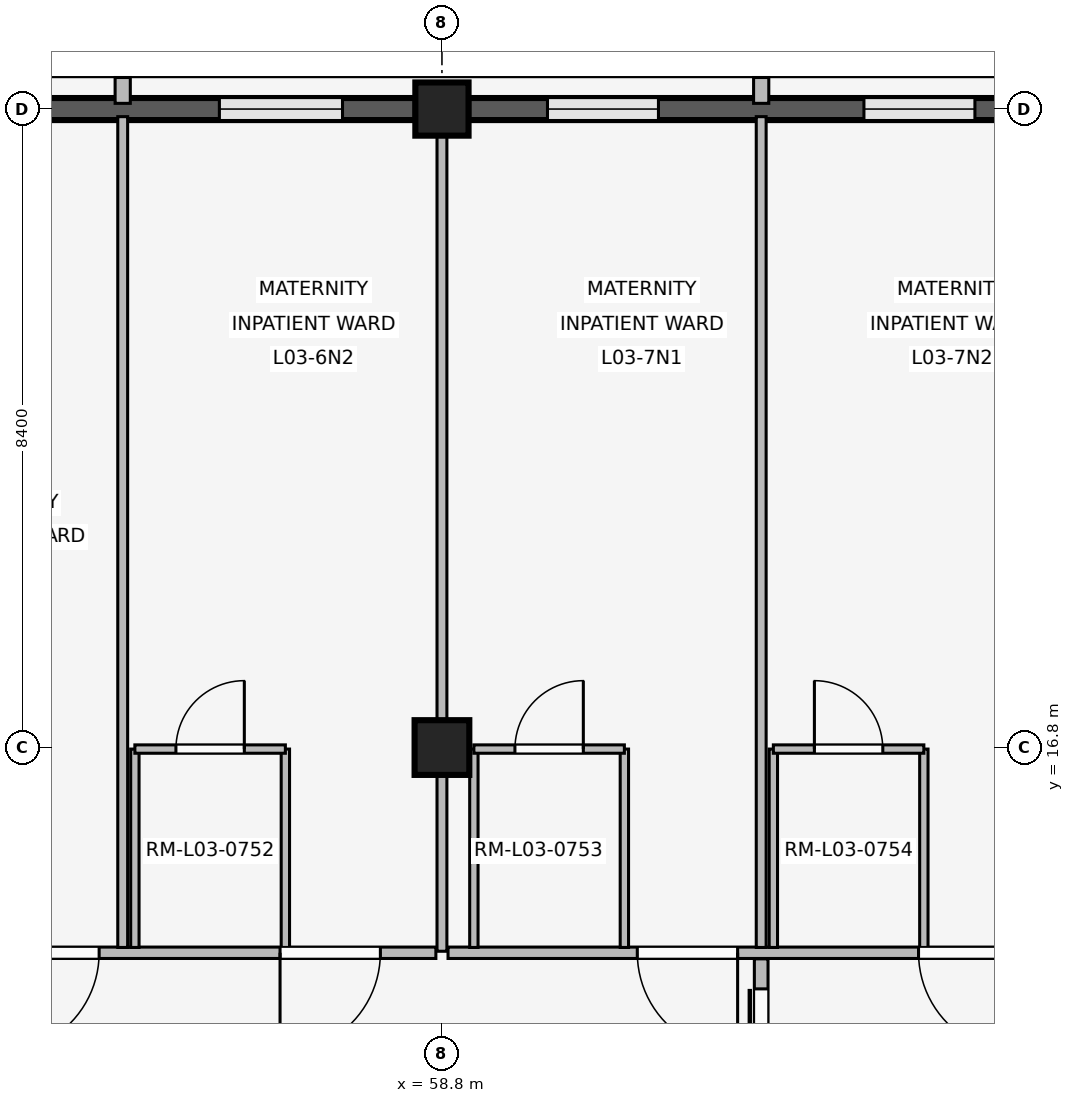
"""IFC4 building model, lengths in metres.
Left out: names, types, materials, properties, quantities, classifications, styles, units other than length and angle.
Written with IfcOpenShell. Run it as: python <this file> out.ifc"""

import sys

from ifc_helpers import new_model, si_unit, direction, frame, frame_2d, origin, origin_2d, place, context, subcontext, project, spatial, rectangle, extrude, element, fill, save


model = new_model("IFC4")
c1 = context("Model", 3, precision=1e-05, world=origin(), true_north=direction((0.0, 1.0)))
c2 = subcontext(c1, "Body", "Model", "MODEL_VIEW")
j1 = project(units=[si_unit("LENGTHUNIT", "METRE"), si_unit("PLANEANGLEUNIT", "RADIAN")], contexts=[c1])
p1 = place(None, origin())
s1 = spatial("IfcSite", under=j1, at=p1, CompositionType="ELEMENT")
p2 = place(p1, origin())
s2 = spatial("IfcBuilding", under=s1, at=p2, CompositionType="ELEMENT")
p3 = place(p2, frame((0.0, 0.0, 12.9)))
s3 = spatial("IfcBuildingStorey", under=s2, at=p3, CompositionType="ELEMENT", Elevation=12.9)
p4 = place(p3, frame((58.8, 16.8, 0.0), z_axis=(0.0, 0.0, 1.0), x_axis=(1.0, 0.0, 0.0)))
e1 = element("IfcColumn", 1, at=p4, inside=s3, PredefinedType="COLUMN", context=c2, shape_type="SweptSolid", body=[
    extrude(rectangle(XDim=0.72, YDim=0.72, at=origin_2d()), origin(), (0.0, 0.0, 1.0), 3.3),
])
p5 = place(p3, frame((58.8, 25.2, 0.0), z_axis=(0.0, 0.0, 1.0), x_axis=(1.0, 0.0, 0.0)))
e2 = element("IfcColumn", 2, at=p5, inside=s3, PredefinedType="COLUMN", context=c2, shape_type="SweptSolid", body=[
    extrude(rectangle(XDim=0.7, YDim=0.7, at=origin_2d()), origin(), (0.0, 0.0, 1.0), 3.3),
])
p6 = place(p3, frame((50.745, 25.2, 0.0), z_axis=(0.0, 0.0, 1.0), x_axis=(1.0, 0.0, 0.0)))
e3 = element("IfcWall", 3, at=p6, inside=s3, PredefinedType="SOLIDWALL", context=c2, shape_type="SweptSolid", body=[
    extrude(rectangle(XDim=7.71, YDim=0.29, at=frame_2d((3.855, 0.0))), origin(), (0.0, 0.0, 1.0), 2.44),
])
p7 = place(p6, frame((0.963, 0.0, 0.85)))
e4 = element("IfcOpeningElement", 4, at=p7, cuts=e3, PredefinedType="OPENING", context=c2, shape_type="SweptSolid", body=[
    extrude(rectangle(XDim=1.62, YDim=0.95, at=frame_2d((0.81, 0.475))), frame((0.0, 0.155, 0.0), z_axis=(0.0, -1.0, 0.0), x_axis=(1.0, 0.0, 0.0)), (0.0, 0.0, 1.0), 0.31),
])
p8 = place(p6, frame((5.127, 0.0, 0.85)))
e5 = element("IfcOpeningElement", 5, at=p8, cuts=e3, PredefinedType="OPENING", context=c2, shape_type="SweptSolid", body=[
    extrude(rectangle(XDim=1.62, YDim=0.95, at=frame_2d((0.81, 0.475))), frame((0.0, 0.155, 0.0), z_axis=(0.0, -1.0, 0.0), x_axis=(1.0, 0.0, 0.0)), (0.0, 0.0, 1.0), 0.31),
])
p9 = place(p3, frame((54.6, 25.275, 0.0), z_axis=(0.0, 0.0, 1.0), x_axis=(0.0, 1.0, 0.0)))
e6 = element("IfcWall", 6, at=p9, inside=s3, PredefinedType="ELEMENTEDWALL", context=c2, shape_type="SweptSolid", body=[
    extrude(rectangle(XDim=0.34, YDim=0.2, at=frame_2d((0.17, 0.0))), origin(), (0.0, 0.0, 1.0), 2.42),
])
p10 = place(p3, frame((59.145, 25.2, 0.0), z_axis=(0.0, 0.0, 1.0), x_axis=(1.0, 0.0, 0.0)))
e7 = element("IfcWall", 7, at=p10, inside=s3, PredefinedType="SOLIDWALL", context=c2, shape_type="SweptSolid", body=[
    extrude(rectangle(XDim=7.71, YDim=0.29, at=frame_2d((3.855, 0.0))), origin(), (0.0, 0.0, 1.0), 2.44),
])
p11 = place(p10, frame((1.043, 0.0, 0.85)))
e8 = element("IfcOpeningElement", 8, at=p11, cuts=e7, PredefinedType="OPENING", context=c2, shape_type="SweptSolid", body=[
    extrude(rectangle(XDim=1.46, YDim=0.85, at=frame_2d((0.73, 0.425))), frame((0.0, 0.155, 0.0), z_axis=(0.0, -1.0, 0.0), x_axis=(1.0, 0.0, 0.0)), (0.0, 0.0, 1.0), 0.31),
])
p12 = place(p10, frame((5.207, 0.0, 0.85)))
e9 = element("IfcOpeningElement", 9, at=p12, cuts=e7, PredefinedType="OPENING", context=c2, shape_type="SweptSolid", body=[
    extrude(rectangle(XDim=1.46, YDim=0.85, at=frame_2d((0.73, 0.425))), frame((0.0, 0.155, 0.0), z_axis=(0.0, -1.0, 0.0), x_axis=(1.0, 0.0, 0.0)), (0.0, 0.0, 1.0), 0.31),
])
p13 = place(p3, frame((63.0, 25.275, 0.0), z_axis=(0.0, 0.0, 1.0), x_axis=(0.0, 1.0, 0.0)))
e10 = element("IfcWall", 10, at=p13, inside=s3, PredefinedType="ELEMENTEDWALL", context=c2, shape_type="SweptSolid", body=[
    extrude(rectangle(XDim=0.34, YDim=0.2, at=frame_2d((0.17, 0.0))), origin(), (0.0, 0.0, 1.0), 2.42),
])
p14 = place(p3, frame((58.72, 14.1, 0.0), z_axis=(0.0, 0.0, 1.0), x_axis=(-1.0, 0.0, 0.0)))
e11 = element("IfcWall", 11, at=p14, inside=s3, PredefinedType="PARTITIONING", context=c2, shape_type="SweptSolid", body=[
    extrude(rectangle(XDim=7.96, YDim=0.15, at=frame_2d((3.98, 0.0))), origin(), (0.0, 0.0, 1.0), 2.42),
])
p15 = place(p14, frame((0.73, 0.0, 0.0)))
e12 = element("IfcOpeningElement", 12, at=p15, cuts=e11, PredefinedType="OPENING", context=c2, shape_type="SweptSolid", body=[
    extrude(rectangle(XDim=1.32, YDim=2.25, at=frame_2d((0.66, 1.125))), frame((0.0, 0.085, 0.0), z_axis=(0.0, -1.0, 0.0), x_axis=(1.0, 0.0, 0.0)), (0.0, 0.0, 1.0), 0.17),
])
p16 = place(p14, frame((4.43, 0.0, 0.0)))
e13 = element("IfcOpeningElement", 13, at=p16, cuts=e11, PredefinedType="OPENING", context=c2, shape_type="SweptSolid", body=[
    extrude(rectangle(XDim=1.32, YDim=2.25, at=frame_2d((0.66, 1.125))), frame((0.0, 0.085, 0.0), z_axis=(0.0, -1.0, 0.0), x_axis=(1.0, 0.0, 0.0)), (0.0, 0.0, 1.0), 0.17),
])
p17 = place(p3, frame((54.6, 14.17, 0.0), z_axis=(0.0, 0.0, 1.0), x_axis=(0.0, 1.0, 0.0)))
e14 = element("IfcWall", 14, at=p17, inside=s3, PredefinedType="PARTITIONING", context=c2, shape_type="SweptSolid", body=[
    extrude(rectangle(XDim=10.93, YDim=0.13, at=frame_2d((5.465, 0.0))), origin(), (0.0, 0.0, 1.0), 2.42),
])
for number, where, z_axis, x_axis in (
    (15, (54.76, 14.17, 0.0), (0.0, 0.0, 1.0), (0.0, 1.0, 0.0)),
    (16, (56.74, 14.17, 0.0), (0.0, 0.0, 1.0), (0.0, 1.0, 0.0)),
):
    element("IfcWall", number, at=place(p3, frame(where, z_axis=z_axis, x_axis=x_axis)), inside=s3, PredefinedType="PARTITIONING", context=c2, shape_type="SweptSolid", body=[
        extrude(rectangle(XDim=2.61, YDim=0.11, at=frame_2d((1.305, 0.0))), origin(), (0.0, 0.0, 1.0), 2.42),
    ])
p18 = place(p3, frame((54.76, 16.78, 0.0), z_axis=(0.0, 0.0, 1.0), x_axis=(1.0, 0.0, 0.0)))
e17 = element("IfcWall", 17, at=p18, inside=s3, PredefinedType="PARTITIONING", context=c2, shape_type="SweptSolid", body=[
    extrude(rectangle(XDim=1.98, YDim=0.11, at=frame_2d((0.99, 0.0))), origin(), (0.0, 0.0, 1.0), 2.42),
])
p19 = place(p18, frame((0.54, 0.0, 0.0)))
e18 = element("IfcOpeningElement", 18, at=p19, cuts=e17, PredefinedType="OPENING", context=c2, shape_type="SweptSolid", body=[
    extrude(rectangle(XDim=0.9, YDim=2.1, at=frame_2d((0.45, 1.05))), frame((0.0, 0.065, 0.0), z_axis=(0.0, -1.0, 0.0), x_axis=(1.0, 0.0, 0.0)), (0.0, 0.0, 1.0), 0.13),
])
p20 = place(p3, frame((58.8, 14.12, 0.0), z_axis=(0.0, 0.0, 1.0), x_axis=(0.0, 1.0, 0.0)))
e19 = element("IfcWall", 19, at=p20, inside=s3, PredefinedType="PARTITIONING", context=c2, shape_type="SweptSolid", body=[
    extrude(rectangle(XDim=10.94, YDim=0.13, at=frame_2d((5.47, 0.0))), origin(), (0.0, 0.0, 1.0), 2.42),
])
p21 = place(p3, frame((67.12, 14.1, 0.0), z_axis=(0.0, 0.0, 1.0), x_axis=(-1.0, 0.0, 0.0)))
e20 = element("IfcWall", 20, at=p21, inside=s3, PredefinedType="PARTITIONING", context=c2, shape_type="SweptSolid", body=[
    extrude(rectangle(XDim=8.24, YDim=0.15, at=frame_2d((4.12, 0.0))), origin(), (0.0, 0.0, 1.0), 2.42),
])
p22 = place(p21, frame((0.73, 0.0, 0.0)))
e21 = element("IfcOpeningElement", 21, at=p22, cuts=e20, PredefinedType="OPENING", context=c2, shape_type="SweptSolid", body=[
    extrude(rectangle(XDim=1.32, YDim=2.25, at=frame_2d((0.66, 1.125))), frame((0.0, 0.085, 0.0), z_axis=(0.0, -1.0, 0.0), x_axis=(1.0, 0.0, 0.0)), (0.0, 0.0, 1.0), 0.17),
])
p23 = place(p21, frame((4.43, 0.0, 0.0)))
e22 = element("IfcOpeningElement", 22, at=p23, cuts=e20, PredefinedType="OPENING", context=c2, shape_type="SweptSolid", body=[
    extrude(rectangle(XDim=1.32, YDim=2.25, at=frame_2d((0.66, 1.125))), frame((0.0, 0.085, 0.0), z_axis=(0.0, -1.0, 0.0), x_axis=(1.0, 0.0, 0.0)), (0.0, 0.0, 1.0), 0.17),
])
p24 = place(p3, frame((63.0, 14.17, 0.0), z_axis=(0.0, 0.0, 1.0), x_axis=(0.0, 1.0, 0.0)))
e23 = element("IfcWall", 23, at=p24, inside=s3, PredefinedType="PARTITIONING", context=c2, shape_type="SweptSolid", body=[
    extrude(rectangle(XDim=10.93, YDim=0.13, at=frame_2d((5.465, 0.0))), origin(), (0.0, 0.0, 1.0), 2.42),
])
for number, where, z_axis, x_axis in (
    (24, (59.22, 14.17, 0.0), (0.0, 0.0, 1.0), (0.0, 1.0, 0.0)),
    (25, (61.2, 14.17, 0.0), (0.0, 0.0, 1.0), (0.0, 1.0, 0.0)),
):
    element("IfcWall", number, at=place(p3, frame(where, z_axis=z_axis, x_axis=x_axis)), inside=s3, PredefinedType="PARTITIONING", context=c2, shape_type="SweptSolid", body=[
        extrude(rectangle(XDim=2.61, YDim=0.11, at=frame_2d((1.305, 0.0))), origin(), (0.0, 0.0, 1.0), 2.42),
    ])
p25 = place(p3, frame((59.22, 16.78, 0.0), z_axis=(0.0, 0.0, 1.0), x_axis=(1.0, 0.0, 0.0)))
e26 = element("IfcWall", 26, at=p25, inside=s3, PredefinedType="PARTITIONING", context=c2, shape_type="SweptSolid", body=[
    extrude(rectangle(XDim=1.98, YDim=0.11, at=frame_2d((0.99, 0.0))), origin(), (0.0, 0.0, 1.0), 2.42),
])
p26 = place(p25, frame((0.54, 0.0, 0.0)))
e27 = element("IfcOpeningElement", 27, at=p26, cuts=e26, PredefinedType="OPENING", context=c2, shape_type="SweptSolid", body=[
    extrude(rectangle(XDim=0.9, YDim=2.1, at=frame_2d((0.45, 1.05))), frame((0.0, 0.065, 0.0), z_axis=(0.0, -1.0, 0.0), x_axis=(1.0, 0.0, 0.0)), (0.0, 0.0, 1.0), 0.13),
])
for number, where, z_axis, x_axis in (
    (28, (63.16, 14.17, 0.0), (0.0, 0.0, 1.0), (0.0, 1.0, 0.0)),
    (29, (65.14, 14.17, 0.0), (0.0, 0.0, 1.0), (0.0, 1.0, 0.0)),
):
    element("IfcWall", number, at=place(p3, frame(where, z_axis=z_axis, x_axis=x_axis)), inside=s3, PredefinedType="PARTITIONING", context=c2, shape_type="SweptSolid", body=[
        extrude(rectangle(XDim=2.61, YDim=0.11, at=frame_2d((1.305, 0.0))), origin(), (0.0, 0.0, 1.0), 2.42),
    ])
p27 = place(p3, frame((63.16, 16.78, 0.0), z_axis=(0.0, 0.0, 1.0), x_axis=(1.0, 0.0, 0.0)))
e30 = element("IfcWall", 30, at=p27, inside=s3, PredefinedType="PARTITIONING", context=c2, shape_type="SweptSolid", body=[
    extrude(rectangle(XDim=1.98, YDim=0.11, at=frame_2d((0.99, 0.0))), origin(), (0.0, 0.0, 1.0), 2.42),
])
p28 = place(p27, frame((0.54, 0.0, 0.0)))
e31 = element("IfcOpeningElement", 31, at=p28, cuts=e30, PredefinedType="OPENING", context=c2, shape_type="SweptSolid", body=[
    extrude(rectangle(XDim=0.9, YDim=2.1, at=frame_2d((0.45, 1.05))), frame((0.0, 0.065, 0.0), z_axis=(0.0, -1.0, 0.0), x_axis=(1.0, 0.0, 0.0)), (0.0, 0.0, 1.0), 0.13),
])
p29 = place(p3, frame((63.0, 11.18, 0.0), z_axis=(0.0, 0.0, 1.0), x_axis=(0.0, 1.0, 0.0)))
e32 = element("IfcWall", 32, at=p29, inside=s3, PredefinedType="PARTITIONING", context=c2, shape_type="SweptSolid", body=[
    extrude(rectangle(XDim=2.84, YDim=0.18, at=frame_2d((1.42, 0.0))), origin(), (0.0, 0.0, 1.0), 2.42),
])
p30 = place(p29, frame((0.395, 0.0, 0.0)))
e33 = element("IfcOpeningElement", 33, at=p30, cuts=e32, PredefinedType="OPENING", context=c2, shape_type="SweptSolid", body=[
    extrude(rectangle(XDim=2.05, YDim=2.35, at=frame_2d((1.025, 1.175))), frame((0.0, 0.1, 0.0), z_axis=(0.0, -1.0, 0.0), x_axis=(1.0, 0.0, 0.0)), (0.0, 0.0, 1.0), 0.2),
])
p31 = place(p8, origin())
e34 = element("IfcWindow", 34, at=p31, inside=s3, PartitioningType="SINGLE_PANEL", PredefinedType="WINDOW", context=c2, shape_type="SweptSolid", body=[
    extrude(rectangle(XDim=1.62, YDim=0.95, at=frame_2d((0.81, 0.475))), frame((0.0, 0.03, 0.0), z_axis=(0.0, -1.0, 0.0), x_axis=(1.0, 0.0, 0.0)), (0.0, 0.0, 1.0), 0.06),
])
fill(e5, e34)
p32 = place(p11, origin())
e35 = element("IfcWindow", 35, at=p32, inside=s3, PartitioningType="SINGLE_PANEL", PredefinedType="WINDOW", context=c2, shape_type="SweptSolid", body=[
    extrude(rectangle(XDim=1.46, YDim=0.85, at=frame_2d((0.73, 0.425))), frame((0.0, 0.03, 0.0), z_axis=(0.0, -1.0, 0.0), x_axis=(1.0, 0.0, 0.0)), (0.0, 0.0, 1.0), 0.06),
])
fill(e8, e35)
p33 = place(p12, origin())
e36 = element("IfcWindow", 36, at=p33, inside=s3, PartitioningType="SINGLE_PANEL", PredefinedType="WINDOW", context=c2, shape_type="SweptSolid", body=[
    extrude(rectangle(XDim=1.46, YDim=0.85, at=frame_2d((0.73, 0.425))), frame((0.0, 0.03, 0.0), z_axis=(0.0, -1.0, 0.0), x_axis=(1.0, 0.0, 0.0)), (0.0, 0.0, 1.0), 0.06),
])
fill(e9, e36)
p34 = place(p15, origin())
e37 = element("IfcDoor", 37, at=p34, inside=s3, OperationType="SINGLE_SWING_RIGHT", PredefinedType="DOOR", context=c2, shape_type="SweptSolid", body=[
    extrude(rectangle(XDim=1.32, YDim=2.25, at=frame_2d((0.66, 1.125))), frame((0.0, 0.025, 0.0), z_axis=(0.0, -1.0, 0.0), x_axis=(1.0, 0.0, 0.0)), (0.0, 0.0, 1.0), 0.05),
])
fill(e12, e37)
p35 = place(p16, origin())
e38 = element("IfcDoor", 38, at=p35, inside=s3, OperationType="SINGLE_SWING_RIGHT", PredefinedType="DOOR", context=c2, shape_type="SweptSolid", body=[
    extrude(rectangle(XDim=1.32, YDim=2.25, at=frame_2d((0.66, 1.125))), frame((0.0, 0.025, 0.0), z_axis=(0.0, -1.0, 0.0), x_axis=(1.0, 0.0, 0.0)), (0.0, 0.0, 1.0), 0.05),
])
fill(e13, e38)
p36 = place(p19, origin())
e39 = element("IfcDoor", 39, at=p36, inside=s3, OperationType="SINGLE_SWING_RIGHT", PredefinedType="DOOR", context=c2, shape_type="SweptSolid", body=[
    extrude(rectangle(XDim=0.9, YDim=2.1, at=frame_2d((0.45, 1.05))), frame((0.0, 0.025, 0.0), z_axis=(0.0, -1.0, 0.0), x_axis=(1.0, 0.0, 0.0)), (0.0, 0.0, 1.0), 0.05),
])
fill(e18, e39)
p37 = place(p22, origin())
e40 = element("IfcDoor", 40, at=p37, inside=s3, OperationType="SINGLE_SWING_LEFT", PredefinedType="DOOR", context=c2, shape_type="SweptSolid", body=[
    extrude(rectangle(XDim=1.32, YDim=2.25, at=frame_2d((0.66, 1.125))), frame((0.0, 0.025, 0.0), z_axis=(0.0, -1.0, 0.0), x_axis=(1.0, 0.0, 0.0)), (0.0, 0.0, 1.0), 0.05),
])
fill(e21, e40)
p38 = place(p23, origin())
e41 = element("IfcDoor", 41, at=p38, inside=s3, OperationType="SINGLE_SWING_LEFT", PredefinedType="DOOR", context=c2, shape_type="SweptSolid", body=[
    extrude(rectangle(XDim=1.32, YDim=2.25, at=frame_2d((0.66, 1.125))), frame((0.0, 0.025, 0.0), z_axis=(0.0, -1.0, 0.0), x_axis=(1.0, 0.0, 0.0)), (0.0, 0.0, 1.0), 0.05),
])
fill(e22, e41)
p39 = place(p26, origin())
e42 = element("IfcDoor", 42, at=p39, inside=s3, OperationType="SINGLE_SWING_RIGHT", PredefinedType="DOOR", context=c2, shape_type="SweptSolid", body=[
    extrude(rectangle(XDim=0.9, YDim=2.1, at=frame_2d((0.45, 1.05))), frame((0.0, 0.025, 0.0), z_axis=(0.0, -1.0, 0.0), x_axis=(1.0, 0.0, 0.0)), (0.0, 0.0, 1.0), 0.05),
])
fill(e27, e42)
p40 = place(p28, origin())
e43 = element("IfcDoor", 43, at=p40, inside=s3, OperationType="SINGLE_SWING_LEFT", PredefinedType="DOOR", context=c2, shape_type="SweptSolid", body=[
    extrude(rectangle(XDim=0.9, YDim=2.1, at=frame_2d((0.45, 1.05))), frame((0.0, 0.025, 0.0), z_axis=(0.0, -1.0, 0.0), x_axis=(1.0, 0.0, 0.0)), (0.0, 0.0, 1.0), 0.05),
])
fill(e31, e43)
p41 = place(p30, origin())
e44 = element("IfcDoor", 44, at=p41, inside=s3, OperationType="SLIDING_TO_LEFT", PredefinedType="DOOR", context=c2, shape_type="SweptSolid", body=[
    extrude(rectangle(XDim=2.05, YDim=2.35, at=frame_2d((1.025, 1.175))), frame((0.0, 0.025, 0.0), z_axis=(0.0, -1.0, 0.0), x_axis=(1.0, 0.0, 0.0)), (0.0, 0.0, 1.0), 0.05),
])
fill(e33, e44)
save(model, sys.argv[1])
